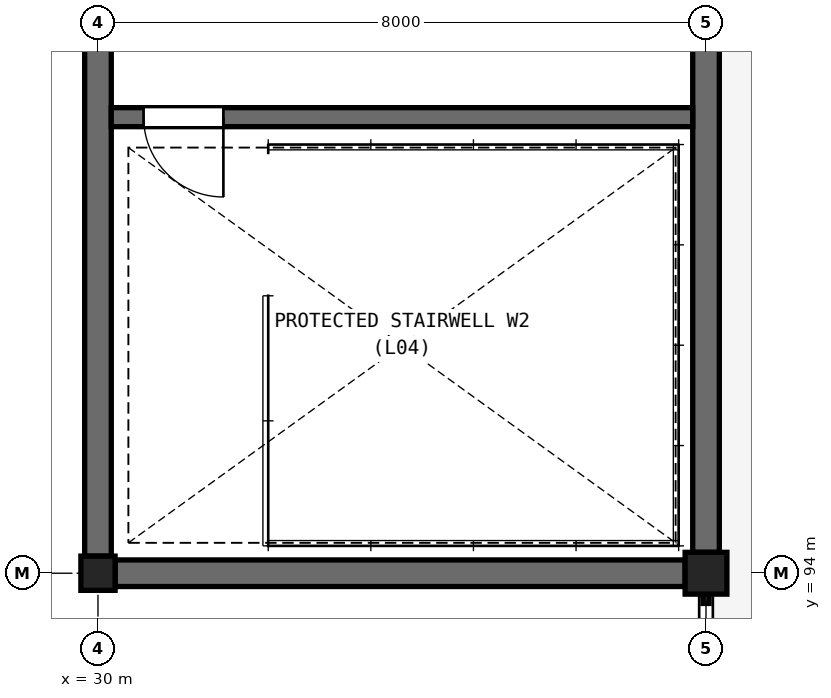
"""IFC4 building model, lengths in metres.
Left out: names, types, materials, properties, quantities, classifications, styles, units other than length and angle.
Written with IfcOpenShell. Run it as: python <this file> out.ifc"""

import sys

from ifc_helpers import new_model, si_unit, direction, frame, frame_2d, origin, origin_2d, place, context, subcontext, project, spatial, rectangle, extrude, element, fill, save


model = new_model("IFC4")
c1 = context("Model", 3, precision=1e-05, world=origin(), true_north=direction((0.0, 1.0)))
c2 = subcontext(c1, "Body", "Model", "MODEL_VIEW")
j1 = project(units=[si_unit("LENGTHUNIT", "METRE"), si_unit("PLANEANGLEUNIT", "RADIAN")], contexts=[c1])
p1 = place(None, origin())
s1 = spatial("IfcSite", under=j1, at=p1, CompositionType="ELEMENT")
p2 = place(p1, origin())
s2 = spatial("IfcBuilding", under=s1, at=p2, CompositionType="ELEMENT")
p3 = place(p2, frame((0.0, 0.0, 19.2)))
s3 = spatial("IfcBuildingStorey", under=s2, at=p3, CompositionType="ELEMENT", Elevation=19.2)
p4 = place(p3, frame((30.0, 94.0, 0.0), z_axis=(0.0, 0.0, 1.0), x_axis=(1.0, 0.0, 0.0)))
e1 = element("IfcColumn", 1, at=p4, inside=s3, PredefinedType="COLUMN", context=c2, shape_type="SweptSolid", body=[
    extrude(rectangle(XDim=0.45, YDim=0.45, at=origin_2d()), origin(), (0.0, 0.0, 1.0), 4.2),
])
p5 = place(p3, frame((38.0, 94.0, 0.0), z_axis=(0.0, 0.0, 1.0), x_axis=(1.0, 0.0, 0.0)))
e2 = element("IfcColumn", 2, at=p5, inside=s3, PredefinedType="COLUMN", context=c2, shape_type="SweptSolid", body=[
    extrude(rectangle(XDim=0.55, YDim=0.55, at=origin_2d()), origin(), (0.0, 0.0, 1.0), 4.2),
])
for number, where, z_axis, x_axis in (
    (3, (30.225, 94.0, 0.0), (0.0, 0.0, 1.0), (1.0, 0.0, 0.0)),
    (4, (30.0, 94.225, 0.0), (0.0, 0.0, 1.0), (0.0, 1.0, 0.0)),
):
    element("IfcWall", number, at=place(p3, frame(where, z_axis=z_axis, x_axis=x_axis)), inside=s3, PredefinedType="SHEAR", context=c2, shape_type="SweptSolid", body=[
        extrude(rectangle(XDim=7.5, YDim=0.35, at=frame_2d((3.75, 0.0))), origin(), (0.0, 0.0, 1.0), 3.98),
    ])
p6 = place(p3, frame((38.0, 94.275, 0.0), z_axis=(0.0, 0.0, 1.0), x_axis=(0.0, 1.0, 0.0)))
e5 = element("IfcWall", 5, at=p6, inside=s3, PredefinedType="SHEAR", context=c2, shape_type="SweptSolid", body=[
    extrude(rectangle(XDim=7.475, YDim=0.35, at=frame_2d((3.738, 0.0))), origin(), (0.0, 0.0, 1.0), 3.98),
])
p7 = place(p3, frame((30.175, 100.0, 0.0), z_axis=(0.0, 0.0, 1.0), x_axis=(1.0, 0.0, 0.0)))
e6 = element("IfcWall", 6, at=p7, inside=s3, PredefinedType="SOLIDWALL", context=c2, shape_type="SweptSolid", body=[
    extrude(rectangle(XDim=7.65, YDim=0.25, at=frame_2d((3.825, 0.0))), origin(), (0.0, 0.0, 1.0), 3.98),
])
p8 = place(p7, frame((0.425, 0.0, 0.0)))
e7 = element("IfcOpeningElement", 7, at=p8, cuts=e6, PredefinedType="OPENING", context=c2, shape_type="SweptSolid", body=[
    extrude(rectangle(XDim=1.05, YDim=2.2, at=frame_2d((0.525, 1.1))), frame((0.0, 0.135, 0.0), z_axis=(0.0, -1.0, 0.0), x_axis=(1.0, 0.0, 0.0)), (0.0, 0.0, 1.0), 0.27),
])
p9 = place(p8, frame((1.05, 0.0, 0.0), z_axis=(0.0, 0.0, 1.0), x_axis=(-1.0, 0.0, 0.0)))
e8 = element("IfcDoor", 8, at=p9, inside=s3, OperationType="SINGLE_SWING_RIGHT", PredefinedType="DOOR", context=c2, shape_type="SweptSolid", body=[
    extrude(rectangle(XDim=1.05, YDim=2.2, at=frame_2d((0.525, 1.1))), frame((0.0, 0.025, 0.0), z_axis=(0.0, -1.0, 0.0), x_axis=(1.0, 0.0, 0.0)), (0.0, 0.0, 1.0), 0.05),
])
fill(e7, e8)
save(model, sys.argv[1])
